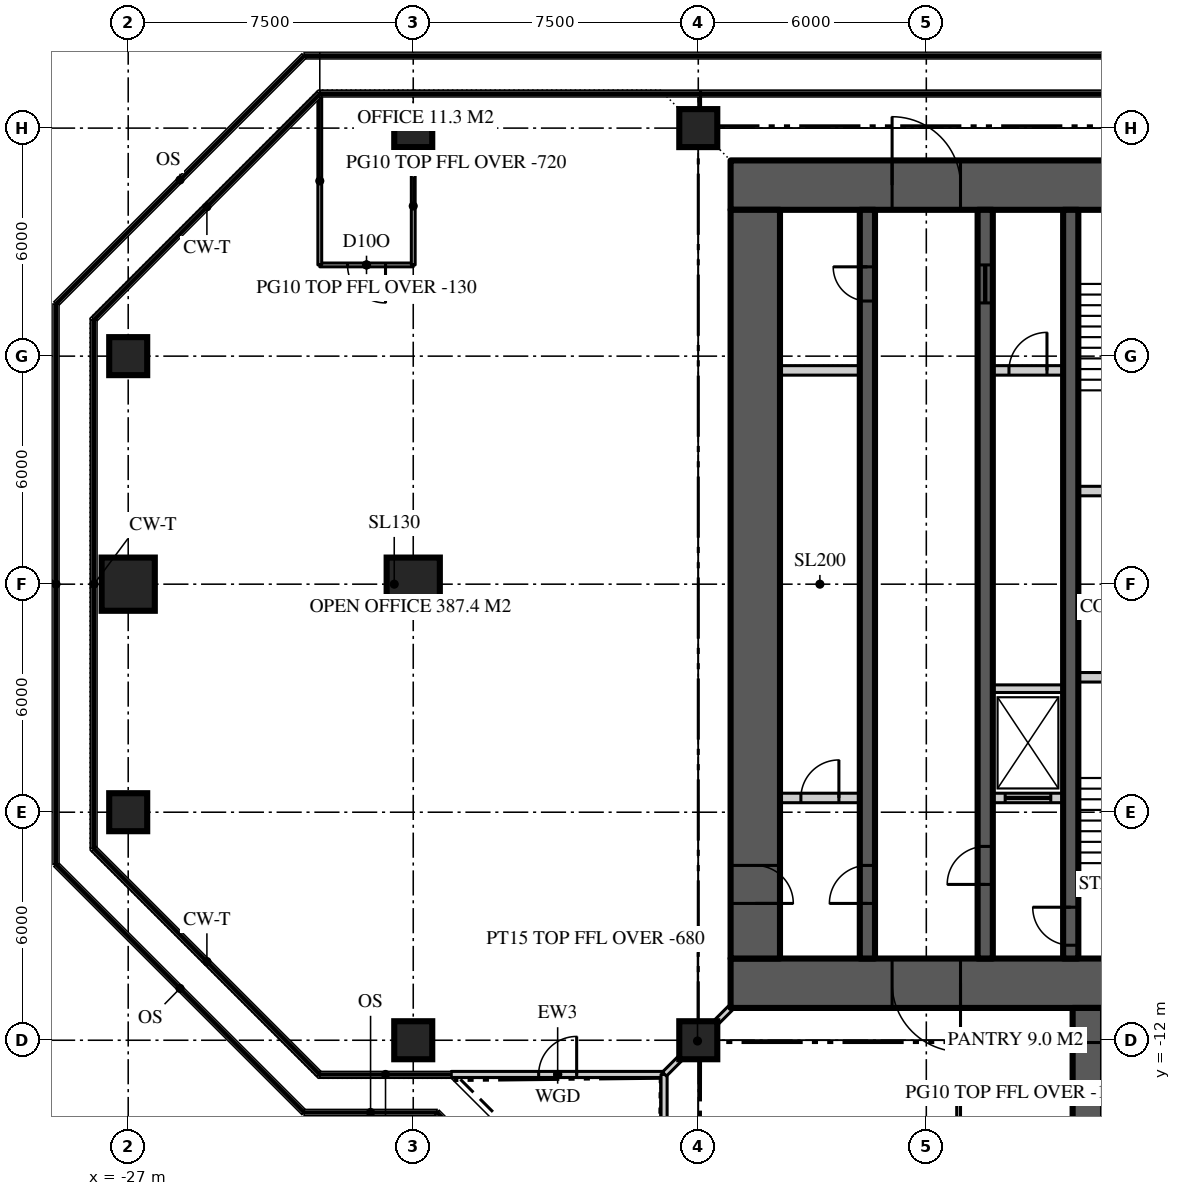
"""IFC4 building model, lengths in metres.
Left out: names, types, materials, properties, quantities, classifications, styles, units other than length and angle.
Written with IfcOpenShell. Run it as: python <this file> out.ifc"""

import sys

from ifc_helpers import new_model, si_unit, direction, frame, frame_2d, origin, origin_2d, place, context, subcontext, project, spatial, rectangle, extrude, element, fill, save


model = new_model("IFC4")
c1 = context("Model", 3, precision=1e-05, world=origin(), true_north=direction((0.0, 1.0)))
c2 = subcontext(c1, "Body", "Model", "MODEL_VIEW")
j1 = project(units=[si_unit("LENGTHUNIT", "METRE"), si_unit("PLANEANGLEUNIT", "RADIAN")], contexts=[c1])
p1 = place(None, origin())
s1 = spatial("IfcSite", under=j1, at=p1, CompositionType="ELEMENT")
p2 = place(p1, origin())
s2 = spatial("IfcBuilding", under=s1, at=p2, CompositionType="ELEMENT")
p3 = place(p2, frame((0.0, 0.0, 271.2)))
s3 = spatial("IfcBuildingStorey", under=s2, at=p3, CompositionType="ELEMENT", Elevation=271.2)
p4 = place(p3, frame((-11.15, 10.5, 0.0), z_axis=(0.0, 0.0, 1.0), x_axis=(1.0, 0.0, 0.0)))
e1 = element("IfcWall", 1, at=p4, inside=s3, PredefinedType="SHEAR", context=c2, shape_type="SweptSolid", body=[
    extrude(rectangle(XDim=22.3, YDim=1.3, at=frame_2d((11.15, 0.0))), origin(), (0.0, 0.0, 1.0), 3.9),
])
p5 = place(p4, frame((4.25, 0.0, 0.0)))
e2 = element("IfcOpeningElement", 2, at=p5, cuts=e1, PredefinedType="OPENING", context=c2, shape_type="SweptSolid", body=[
    extrude(rectangle(XDim=1.8, YDim=2.2, at=frame_2d((0.9, 1.1))), frame((0.0, 0.66, 0.0), z_axis=(0.0, -1.0, 0.0), x_axis=(1.0, 0.0, 0.0)), (0.0, 0.0, 1.0), 1.32),
])
p6 = place(p4, frame((16.25, 0.0, 0.0)))
e3 = element("IfcOpeningElement", 3, at=p6, cuts=e1, PredefinedType="OPENING", context=c2, shape_type="SweptSolid", body=[
    extrude(rectangle(XDim=1.8, YDim=2.2, at=frame_2d((0.9, 1.1))), frame((0.0, 0.66, 0.0), z_axis=(0.0, -1.0, 0.0), x_axis=(1.0, 0.0, 0.0)), (0.0, 0.0, 1.0), 1.32),
])
p7 = place(p3, frame((11.15, -10.5, 0.0), z_axis=(0.0, 0.0, 1.0), x_axis=(-1.0, 0.0, 0.0)))
e4 = element("IfcWall", 4, at=p7, inside=s3, PredefinedType="SHEAR", context=c2, shape_type="SweptSolid", body=[
    extrude(rectangle(XDim=22.3, YDim=1.3, at=frame_2d((11.15, 0.0))), origin(), (0.0, 0.0, 1.0), 3.9),
])
p8 = place(p7, frame((16.25, 0.0, 0.0)))
e5 = element("IfcOpeningElement", 5, at=p8, cuts=e4, PredefinedType="OPENING", context=c2, shape_type="SweptSolid", body=[
    extrude(rectangle(XDim=1.8, YDim=2.2, at=frame_2d((0.9, 1.1))), frame((0.0, 0.66, 0.0), z_axis=(0.0, -1.0, 0.0), x_axis=(1.0, 0.0, 0.0)), (0.0, 0.0, 1.0), 1.32),
])
p9 = place(p7, frame((4.25, 0.0, 0.0)))
e6 = element("IfcOpeningElement", 6, at=p9, cuts=e4, PredefinedType="OPENING", context=c2, shape_type="SweptSolid", body=[
    extrude(rectangle(XDim=1.8, YDim=2.2, at=frame_2d((0.9, 1.1))), frame((0.0, 0.66, 0.0), z_axis=(0.0, -1.0, 0.0), x_axis=(1.0, 0.0, 0.0)), (0.0, 0.0, 1.0), 1.32),
])
p10 = place(p3, frame((-10.5, 9.85, 0.0), z_axis=(0.0, 0.0, 1.0), x_axis=(0.0, -1.0, 0.0)))
e7 = element("IfcWall", 7, at=p10, inside=s3, PredefinedType="SHEAR", context=c2, shape_type="SweptSolid", body=[
    extrude(rectangle(XDim=19.7, YDim=1.3, at=frame_2d((9.85, 0.0))), origin(), (0.0, 0.0, 1.0), 3.9),
])
p11 = place(p10, frame((17.25, 0.0, 0.0)))
e8 = element("IfcOpeningElement", 8, at=p11, cuts=e7, PredefinedType="OPENING", context=c2, shape_type="SweptSolid", body=[
    extrude(rectangle(XDim=1.0, YDim=2.2, at=frame_2d((0.5, 1.1))), frame((0.0, 0.66, 0.0), z_axis=(0.0, -1.0, 0.0), x_axis=(1.0, 0.0, 0.0)), (0.0, 0.0, 1.0), 1.32),
])
p12 = place(p3, frame((-1.75, -11.15, 0.0), z_axis=(0.0, 0.0, 1.0), x_axis=(0.0, -1.0, 0.0)))
e9 = element("IfcWall", 9, at=p12, inside=s3, PredefinedType="SHEAR", context=c2, shape_type="SweptSolid", body=[
    extrude(rectangle(XDim=15.25, YDim=0.8, at=frame_2d((7.625, 0.0))), origin(), (0.0, 0.0, 1.0), 3.9),
])
for number, where, z_axis, x_axis in (
    (10, (-19.5, -12.0, 0.0), (0.0, 0.0, 1.0), (1.0, 0.0, 0.0)),
    (11, (-12.0, -12.0, 0.0), (0.0, 0.0, 1.0), (1.0, 0.0, 0.0)),
    (12, (-27.0, -6.0, 0.0), (0.0, 0.0, 1.0), (1.0, 0.0, 0.0)),
):
    element("IfcColumn", number, at=place(p3, frame(where, z_axis=z_axis, x_axis=x_axis)), inside=s3, PredefinedType="COLUMN", context=c2, shape_type="SweptSolid", body=[
        extrude(rectangle(XDim=1.0, YDim=1.0, at=origin_2d()), origin(), (0.0, 0.0, 1.0), 3.9),
    ])
for number, where, z_axis, x_axis in (
    (13, (-27.0, 0.0, 0.0), (0.0, 0.0, 1.0), (1.0, 0.0, 0.0)),
    (14, (-19.5, 0.0, 0.0), (0.0, 0.0, 1.0), (1.0, 0.0, 0.0)),
):
    element("IfcColumn", number, at=place(p3, frame(where, z_axis=z_axis, x_axis=x_axis)), inside=s3, PredefinedType="COLUMN", context=c2, shape_type="SweptSolid", body=[
        extrude(rectangle(XDim=1.4, YDim=1.4, at=origin_2d()), origin(), (0.0, 0.0, 1.0), 3.9),
    ])
for number, where, z_axis, x_axis in (
    (15, (-27.0, 6.0, 0.0), (0.0, 0.0, 1.0), (1.0, 0.0, 0.0)),
    (16, (-19.5, 12.0, 0.0), (0.0, 0.0, 1.0), (1.0, 0.0, 0.0)),
    (17, (-12.0, 12.0, 0.0), (0.0, 0.0, 1.0), (1.0, 0.0, 0.0)),
):
    element("IfcColumn", number, at=place(p3, frame(where, z_axis=z_axis, x_axis=x_axis)), inside=s3, PredefinedType="COLUMN", context=c2, shape_type="SweptSolid", body=[
        extrude(rectangle(XDim=1.0, YDim=1.0, at=origin_2d()), origin(), (0.0, 0.0, 1.0), 3.9),
    ])
p13 = place(p3, frame((-18.5, -12.9, 0.0), z_axis=(0.0, 0.0, 1.0), x_axis=(1.0, 0.0, 0.0)))
e18 = element("IfcWall", 18, at=p13, inside=s3, PredefinedType="SOLIDWALL", context=c2, shape_type="SweptSolid", body=[
    extrude(rectangle(XDim=5.6, YDim=0.16, at=frame_2d((2.8, 0.0))), origin(), (0.0, 0.0, 1.0), 3.77),
])
p14 = place(p13, frame((2.3, 0.0, 0.0)))
e19 = element("IfcOpeningElement", 19, at=p14, cuts=e18, PredefinedType="OPENING", context=c2, shape_type="SweptSolid", body=[
    extrude(rectangle(XDim=1.0, YDim=2.2, at=frame_2d((0.5, 1.1))), frame((0.0, 0.09, 0.0), z_axis=(0.0, -1.0, 0.0), x_axis=(1.0, 0.0, 0.0)), (0.0, 0.0, 1.0), 0.18),
])
p15 = place(p3, frame((-12.9, -12.9, 0.0), z_axis=(0.0, 0.0, 1.0), x_axis=(0.0, -1.0, 0.0)))
e20 = element("IfcWall", 20, at=p15, inside=s3, PredefinedType="SOLIDWALL", context=c2, shape_type="SweptSolid", body=[
    extrude(rectangle(XDim=5.6, YDim=0.16, at=frame_2d((2.8, 0.0))), origin(), (0.0, 0.0, 1.0), 3.77),
])
p16 = place(p3, frame((-7.55, -9.85, 0.0), z_axis=(0.0, 0.0, 1.0), x_axis=(0.0, 1.0, 0.0)))
e21 = element("IfcWall", 21, at=p16, inside=s3, PredefinedType="SHEAR", context=c2, shape_type="SweptSolid", body=[
    extrude(rectangle(XDim=19.7, YDim=0.4, at=frame_2d((9.85, 0.0))), origin(), (0.0, 0.0, 1.0), 3.9),
])
p17 = place(p16, frame((1.45, 0.0, 0.0)))
e22 = element("IfcOpeningElement", 22, at=p17, cuts=e21, PredefinedType="OPENING", context=c2, shape_type="SweptSolid", body=[
    extrude(rectangle(XDim=1.0, YDim=2.2, at=frame_2d((0.5, 1.1))), frame((0.0, 0.21, 0.0), z_axis=(0.0, -1.0, 0.0), x_axis=(1.0, 0.0, 0.0)), (0.0, 0.0, 1.0), 0.42),
])
p18 = place(p16, frame((17.3, 0.0, 0.0)))
e23 = element("IfcOpeningElement", 23, at=p18, cuts=e21, PredefinedType="OPENING", context=c2, shape_type="SweptSolid", body=[
    extrude(rectangle(XDim=0.9, YDim=2.1, at=frame_2d((0.45, 1.05))), frame((0.0, 0.21, 0.0), z_axis=(0.0, -1.0, 0.0), x_axis=(1.0, 0.0, 0.0)), (0.0, 0.0, 1.0), 0.42),
])
p19 = place(p3, frame((-4.45, -9.85, 0.0), z_axis=(0.0, 0.0, 1.0), x_axis=(0.0, 1.0, 0.0)))
e24 = element("IfcWall", 24, at=p19, inside=s3, PredefinedType="SHEAR", context=c2, shape_type="SweptSolid", body=[
    extrude(rectangle(XDim=19.7, YDim=0.4, at=frame_2d((9.85, 0.0))), origin(), (0.0, 0.0, 1.0), 3.9),
])
p20 = place(p19, frame((1.95, 0.0, 0.0)))
e25 = element("IfcOpeningElement", 25, at=p20, cuts=e24, PredefinedType="OPENING", context=c2, shape_type="SweptSolid", body=[
    extrude(rectangle(XDim=1.0, YDim=2.2, at=frame_2d((0.5, 1.1))), frame((0.0, 0.21, 0.0), z_axis=(0.0, -1.0, 0.0), x_axis=(1.0, 0.0, 0.0)), (0.0, 0.0, 1.0), 0.42),
])
p21 = place(p19, frame((17.25, 0.0, 0.0)))
e26 = element("IfcOpeningElement", 26, at=p21, cuts=e24, PredefinedType="OPENING", context=c2, shape_type="SweptSolid", body=[
    extrude(rectangle(XDim=1.0, YDim=2.1, at=frame_2d((0.5, 1.05))), frame((0.0, 0.21, 0.0), z_axis=(0.0, -1.0, 0.0), x_axis=(1.0, 0.0, 0.0)), (0.0, 0.0, 1.0), 0.42),
])
p22 = place(p3, frame((-2.2, -9.85, 0.0), z_axis=(0.0, 0.0, 1.0), x_axis=(0.0, 1.0, 0.0)))
e27 = element("IfcWall", 27, at=p22, inside=s3, PredefinedType="SHEAR", context=c2, shape_type="SweptSolid", body=[
    extrude(rectangle(XDim=19.7, YDim=0.4, at=frame_2d((9.85, 0.0))), origin(), (0.0, 0.0, 1.0), 3.9),
])
p23 = place(p22, frame((0.35, 0.0, 0.0)))
e28 = element("IfcOpeningElement", 28, at=p23, cuts=e27, PredefinedType="OPENING", context=c2, shape_type="SweptSolid", body=[
    extrude(rectangle(XDim=1.0, YDim=2.2, at=frame_2d((0.5, 1.1))), frame((0.0, 0.21, 0.0), z_axis=(0.0, -1.0, 0.0), x_axis=(1.0, 0.0, 0.0)), (0.0, 0.0, 1.0), 0.42),
])
p24 = place(p3, frame((-9.85, 5.625, 0.0), z_axis=(0.0, 0.0, 1.0), x_axis=(1.0, 0.0, 0.0)))
e29 = element("IfcWall", 29, at=p24, inside=s3, PredefinedType="SOLIDWALL", context=c2, shape_type="SweptSolid", body=[
    extrude(rectangle(XDim=2.1, YDim=0.25, at=frame_2d((1.05, 0.0))), origin(), (0.0, 0.0, 1.0), 3.7),
])
p25 = place(p3, frame((-4.25, 5.625, 0.0), z_axis=(0.0, 0.0, 1.0), x_axis=(1.0, 0.0, 0.0)))
e30 = element("IfcWall", 30, at=p25, inside=s3, PredefinedType="SOLIDWALL", context=c2, shape_type="SweptSolid", body=[
    extrude(rectangle(XDim=1.85, YDim=0.25, at=frame_2d((0.925, 0.0))), origin(), (0.0, 0.0, 1.0), 3.7),
])
p26 = place(p25, frame((0.425, 0.0, 0.0)))
e31 = element("IfcOpeningElement", 31, at=p26, cuts=e30, PredefinedType="OPENING", context=c2, shape_type="SweptSolid", body=[
    extrude(rectangle(XDim=1.0, YDim=2.2, at=frame_2d((0.5, 1.1))), frame((0.0, 0.135, 0.0), z_axis=(0.0, -1.0, 0.0), x_axis=(1.0, 0.0, 0.0)), (0.0, 0.0, 1.0), 0.27),
])
p27 = place(p3, frame((-9.85, -5.625, 0.0), z_axis=(0.0, 0.0, 1.0), x_axis=(1.0, 0.0, 0.0)))
e32 = element("IfcWall", 32, at=p27, inside=s3, PredefinedType="SOLIDWALL", context=c2, shape_type="SweptSolid", body=[
    extrude(rectangle(XDim=2.1, YDim=0.25, at=frame_2d((1.05, 0.0))), origin(), (0.0, 0.0, 1.0), 3.7),
])
p28 = place(p27, frame((0.55, 0.0, 0.0)))
e33 = element("IfcOpeningElement", 33, at=p28, cuts=e32, PredefinedType="OPENING", context=c2, shape_type="SweptSolid", body=[
    extrude(rectangle(XDim=1.0, YDim=2.2, at=frame_2d((0.5, 1.1))), frame((0.0, 0.135, 0.0), z_axis=(0.0, -1.0, 0.0), x_axis=(1.0, 0.0, 0.0)), (0.0, 0.0, 1.0), 0.27),
])
p29 = place(p3, frame((-4.25, -5.625, 0.0), z_axis=(0.0, 0.0, 1.0), x_axis=(1.0, 0.0, 0.0)))
e34 = element("IfcWall", 34, at=p29, inside=s3, PredefinedType="SOLIDWALL", context=c2, shape_type="SweptSolid", body=[
    extrude(rectangle(XDim=1.85, YDim=0.25, at=frame_2d((0.925, 0.0))), origin(), (0.0, 0.0, 1.0), 3.7),
])
p30 = place(p29, frame((0.325, 0.0, 0.0)))
e35 = element("IfcOpeningElement", 35, at=p30, cuts=e34, PredefinedType="OPENING", context=c2, shape_type="SweptSolid", body=[
    extrude(rectangle(XDim=1.2, YDim=2.2, at=frame_2d((0.6, 1.1))), frame((0.0, 0.135, 0.0), z_axis=(0.0, -1.0, 0.0), x_axis=(1.0, 0.0, 0.0)), (0.0, 0.0, 1.0), 0.27),
])
for number, where, z_axis, x_axis in (
    (36, (-2.0, -2.45, 0.0), (0.0, 0.0, 1.0), (1.0, 0.0, 0.0)),
    (37, (-2.0, 2.45, 0.0), (0.0, 0.0, 1.0), (1.0, 0.0, 0.0)),
):
    element("IfcWall", number, at=place(p3, frame(where, z_axis=z_axis, x_axis=x_axis)), inside=s3, PredefinedType="SOLIDWALL", context=c2, shape_type="SweptSolid", body=[
        extrude(rectangle(XDim=4.0, YDim=0.25, at=frame_2d((2.0, 0.0))), origin(), (0.0, 0.0, 1.0), 3.7),
    ])
p31 = place(p3, frame((-4.25, -2.75, 0.0), z_axis=(0.0, 0.0, 1.0), x_axis=(1.0, 0.0, 0.0)))
e38 = element("IfcWall", 38, at=p31, inside=s3, PredefinedType="SOLIDWALL", context=c2, shape_type="SweptSolid", body=[
    extrude(rectangle(XDim=1.85, YDim=0.2, at=frame_2d((0.925, 0.0))), origin(), (0.0, 0.0, 1.0), 3.7),
])
p32 = place(p3, frame((-19.5, 8.4, 0.0), z_axis=(0.0, 0.0, 1.0), x_axis=(-1.0, 0.0, 0.0)))
e39 = element("IfcWall", 39, at=p32, inside=s3, PredefinedType="PARTITIONING", context=c2, shape_type="SweptSolid", body=[
    extrude(rectangle(XDim=2.459, YDim=0.1, at=frame_2d((1.229, 0.0))), origin(), (0.0, 0.0, 1.0), 3.77),
])
p33 = place(p32, frame((0.729, 0.0, 0.0)))
e40 = element("IfcOpeningElement", 40, at=p33, cuts=e39, PredefinedType="OPENING", context=c2, shape_type="SweptSolid", body=[
    extrude(rectangle(XDim=1.0, YDim=2.2, at=frame_2d((0.5, 1.1))), frame((0.0, 0.06, 0.0), z_axis=(0.0, -1.0, 0.0), x_axis=(1.0, 0.0, 0.0)), (0.0, 0.0, 1.0), 0.12),
])
p34 = place(p3, frame((-19.5, 8.4, 0.0), z_axis=(0.0, 0.0, 1.0), x_axis=(0.0, 1.0, 0.0)))
e41 = element("IfcWall", 41, at=p34, inside=s3, PredefinedType="PARTITIONING", context=c2, shape_type="SweptSolid", body=[
    extrude(rectangle(XDim=3.1, YDim=0.1, at=frame_2d((1.55, 0.0))), origin(), (0.0, 0.0, 1.0), 3.18),
])
p35 = place(p3, frame((-21.959, 8.4, 0.0), z_axis=(0.0, 0.0, 1.0), x_axis=(0.0, 1.0, 0.0)))
e42 = element("IfcWall", 42, at=p35, inside=s3, PredefinedType="PARTITIONING", context=c2, shape_type="SweptSolid", body=[
    extrude(rectangle(XDim=4.42, YDim=0.1, at=frame_2d((2.21, 0.0))), origin(), (0.0, 0.0, 1.0), 3.77),
])
p36 = place(p3, frame((-2.15, -13.4, 0.0), z_axis=(0.0, 0.0, 1.0), x_axis=(-1.0, 0.0, 0.0)))
e43 = element("IfcWall", 43, at=p36, inside=s3, PredefinedType="PARTITIONING", context=c2, shape_type="SweptSolid", body=[
    extrude(rectangle(XDim=3.0, YDim=0.1, at=frame_2d((1.5, 0.0))), origin(), (0.0, 0.0, 1.0), 3.77),
])
p37 = place(p3, frame((-5.15, -13.35, 0.0), z_axis=(0.0, 0.0, 1.0), x_axis=(0.0, -1.0, 0.0)))
e44 = element("IfcWall", 44, at=p37, inside=s3, PredefinedType="PARTITIONING", context=c2, shape_type="SweptSolid", body=[
    extrude(rectangle(XDim=3.1, YDim=0.1, at=frame_2d((1.55, 0.0))), origin(), (0.0, 0.0, 1.0), 3.77),
])
p38 = place(p37, frame((1.05, 0.0, 0.0)))
e45 = element("IfcOpeningElement", 45, at=p38, cuts=e44, PredefinedType="OPENING", context=c2, shape_type="SweptSolid", body=[
    extrude(rectangle(XDim=1.0, YDim=2.2, at=frame_2d((0.5, 1.1))), frame((0.0, 0.06, 0.0), z_axis=(0.0, -1.0, 0.0), x_axis=(1.0, 0.0, 0.0)), (0.0, 0.0, 1.0), 0.12),
])
p39 = place(p3, frame((-11.15, -11.15, 0.0), z_axis=(0.0, 0.0, 1.0), x_axis=(-0.707106781187, -0.707106781187, 0.0)))
e46 = element("IfcWall", 46, at=p39, inside=s3, PredefinedType="PARTITIONING", context=c2, shape_type="SweptSolid", body=[
    extrude(rectangle(XDim=2.461, YDim=0.15, at=frame_2d((1.23, 0.0))), origin(), (0.0, 0.0, 1.0), 3.22),
])
p40 = place(p14, origin())
e47 = element("IfcDoor", 47, at=p40, inside=s3, OperationType="SINGLE_SWING_RIGHT", PredefinedType="DOOR", context=c2, shape_type="SweptSolid", body=[
    extrude(rectangle(XDim=1.0, YDim=2.2, at=frame_2d((0.5, 1.1))), frame((0.0, 0.025, 0.0), z_axis=(0.0, -1.0, 0.0), x_axis=(1.0, 0.0, 0.0)), (0.0, 0.0, 1.0), 0.05),
])
fill(e19, e47)
p41 = place(p5, origin())
e48 = element("IfcDoor", 48, at=p41, inside=s3, OperationType="DOUBLE_DOOR_DOUBLE_SWING", PredefinedType="DOOR", context=c2, shape_type="SweptSolid", body=[
    extrude(rectangle(XDim=1.8, YDim=2.2, at=frame_2d((0.9, 1.1))), frame((0.0, 0.025, 0.0), z_axis=(0.0, -1.0, 0.0), x_axis=(1.0, 0.0, 0.0)), (0.0, 0.0, 1.0), 0.05),
])
fill(e2, e48)
p42 = place(p8, origin())
e49 = element("IfcDoor", 49, at=p42, inside=s3, OperationType="DOUBLE_DOOR_DOUBLE_SWING", PredefinedType="DOOR", context=c2, shape_type="SweptSolid", body=[
    extrude(rectangle(XDim=1.8, YDim=2.2, at=frame_2d((0.9, 1.1))), frame((0.0, 0.025, 0.0), z_axis=(0.0, -1.0, 0.0), x_axis=(1.0, 0.0, 0.0)), (0.0, 0.0, 1.0), 0.05),
])
fill(e5, e49)
p43 = place(p17, origin())
e50 = element("IfcDoor", 50, at=p43, inside=s3, OperationType="SINGLE_SWING_LEFT", PredefinedType="DOOR", context=c2, shape_type="SweptSolid", body=[
    extrude(rectangle(XDim=1.0, YDim=2.2, at=frame_2d((0.5, 1.1))), frame((0.0, 0.025, 0.0), z_axis=(0.0, -1.0, 0.0), x_axis=(1.0, 0.0, 0.0)), (0.0, 0.0, 1.0), 0.05),
])
fill(e22, e50)
p44 = place(p11, origin())
e51 = element("IfcDoor", 51, at=p44, inside=s3, OperationType="SINGLE_SWING_RIGHT", PredefinedType="DOOR", context=c2, shape_type="SweptSolid", body=[
    extrude(rectangle(XDim=1.0, YDim=2.2, at=frame_2d((0.5, 1.1))), frame((0.0, 0.025, 0.0), z_axis=(0.0, -1.0, 0.0), x_axis=(1.0, 0.0, 0.0)), (0.0, 0.0, 1.0), 0.05),
])
fill(e8, e51)
p45 = place(p20, origin())
e52 = element("IfcDoor", 52, at=p45, inside=s3, OperationType="SINGLE_SWING_LEFT", PredefinedType="DOOR", context=c2, shape_type="SweptSolid", body=[
    extrude(rectangle(XDim=1.0, YDim=2.2, at=frame_2d((0.5, 1.1))), frame((0.0, 0.025, 0.0), z_axis=(0.0, -1.0, 0.0), x_axis=(1.0, 0.0, 0.0)), (0.0, 0.0, 1.0), 0.05),
])
fill(e25, e52)
p46 = place(p23, origin())
e53 = element("IfcDoor", 53, at=p46, inside=s3, OperationType="SINGLE_SWING_RIGHT", PredefinedType="DOOR", context=c2, shape_type="SweptSolid", body=[
    extrude(rectangle(XDim=1.0, YDim=2.2, at=frame_2d((0.5, 1.1))), frame((0.0, 0.025, 0.0), z_axis=(0.0, -1.0, 0.0), x_axis=(1.0, 0.0, 0.0)), (0.0, 0.0, 1.0), 0.05),
])
fill(e28, e53)
p47 = place(p18, origin())
e54 = element("IfcDoor", 54, at=p47, inside=s3, OperationType="SINGLE_SWING_RIGHT", PredefinedType="DOOR", context=c2, shape_type="SweptSolid", body=[
    extrude(rectangle(XDim=0.9, YDim=2.1, at=frame_2d((0.45, 1.05))), frame((0.0, 0.025, 0.0), z_axis=(0.0, -1.0, 0.0), x_axis=(1.0, 0.0, 0.0)), (0.0, 0.0, 1.0), 0.05),
])
fill(e23, e54)
p48 = place(p21, origin())
e55 = element("IfcDoor", 55, at=p48, inside=s3, OperationType="SLIDING_TO_LEFT", PredefinedType="DOOR", context=c2, shape_type="SweptSolid", body=[
    extrude(rectangle(XDim=1.0, YDim=2.1, at=frame_2d((0.5, 1.05))), frame((0.0, 0.025, 0.0), z_axis=(0.0, -1.0, 0.0), x_axis=(1.0, 0.0, 0.0)), (0.0, 0.0, 1.0), 0.05),
])
fill(e26, e55)
p49 = place(p30, origin())
e56 = element("IfcDoor", 56, at=p49, inside=s3, OperationType="SLIDING_TO_LEFT", PredefinedType="DOOR", context=c2, shape_type="SweptSolid", body=[
    extrude(rectangle(XDim=1.2, YDim=2.2, at=frame_2d((0.6, 1.1))), frame((0.0, 0.025, 0.0), z_axis=(0.0, -1.0, 0.0), x_axis=(1.0, 0.0, 0.0)), (0.0, 0.0, 1.0), 0.05),
])
fill(e35, e56)
p50 = place(p33, origin())
e57 = element("IfcDoor", 57, at=p50, inside=s3, OperationType="SINGLE_SWING_LEFT", PredefinedType="DOOR", context=c2, shape_type="SweptSolid", body=[
    extrude(rectangle(XDim=1.0, YDim=2.2, at=frame_2d((0.5, 1.1))), frame((0.0, 0.025, 0.0), z_axis=(0.0, -1.0, 0.0), x_axis=(1.0, 0.0, 0.0)), (0.0, 0.0, 1.0), 0.05),
])
fill(e40, e57)
p51 = place(p28, origin())
e58 = element("IfcDoor", 58, at=p51, inside=s3, OperationType="SINGLE_SWING_RIGHT", PredefinedType="DOOR", context=c2, shape_type="SweptSolid", body=[
    extrude(rectangle(XDim=1.0, YDim=2.2, at=frame_2d((0.5, 1.1))), frame((0.0, 0.025, 0.0), z_axis=(0.0, -1.0, 0.0), x_axis=(1.0, 0.0, 0.0)), (0.0, 0.0, 1.0), 0.05),
])
fill(e33, e58)
p52 = place(p26, origin())
e59 = element("IfcDoor", 59, at=p52, inside=s3, OperationType="SINGLE_SWING_RIGHT", PredefinedType="DOOR", context=c2, shape_type="SweptSolid", body=[
    extrude(rectangle(XDim=1.0, YDim=2.2, at=frame_2d((0.5, 1.1))), frame((0.0, 0.025, 0.0), z_axis=(0.0, -1.0, 0.0), x_axis=(1.0, 0.0, 0.0)), (0.0, 0.0, 1.0), 0.05),
])
fill(e31, e59)
save(model, sys.argv[1])
